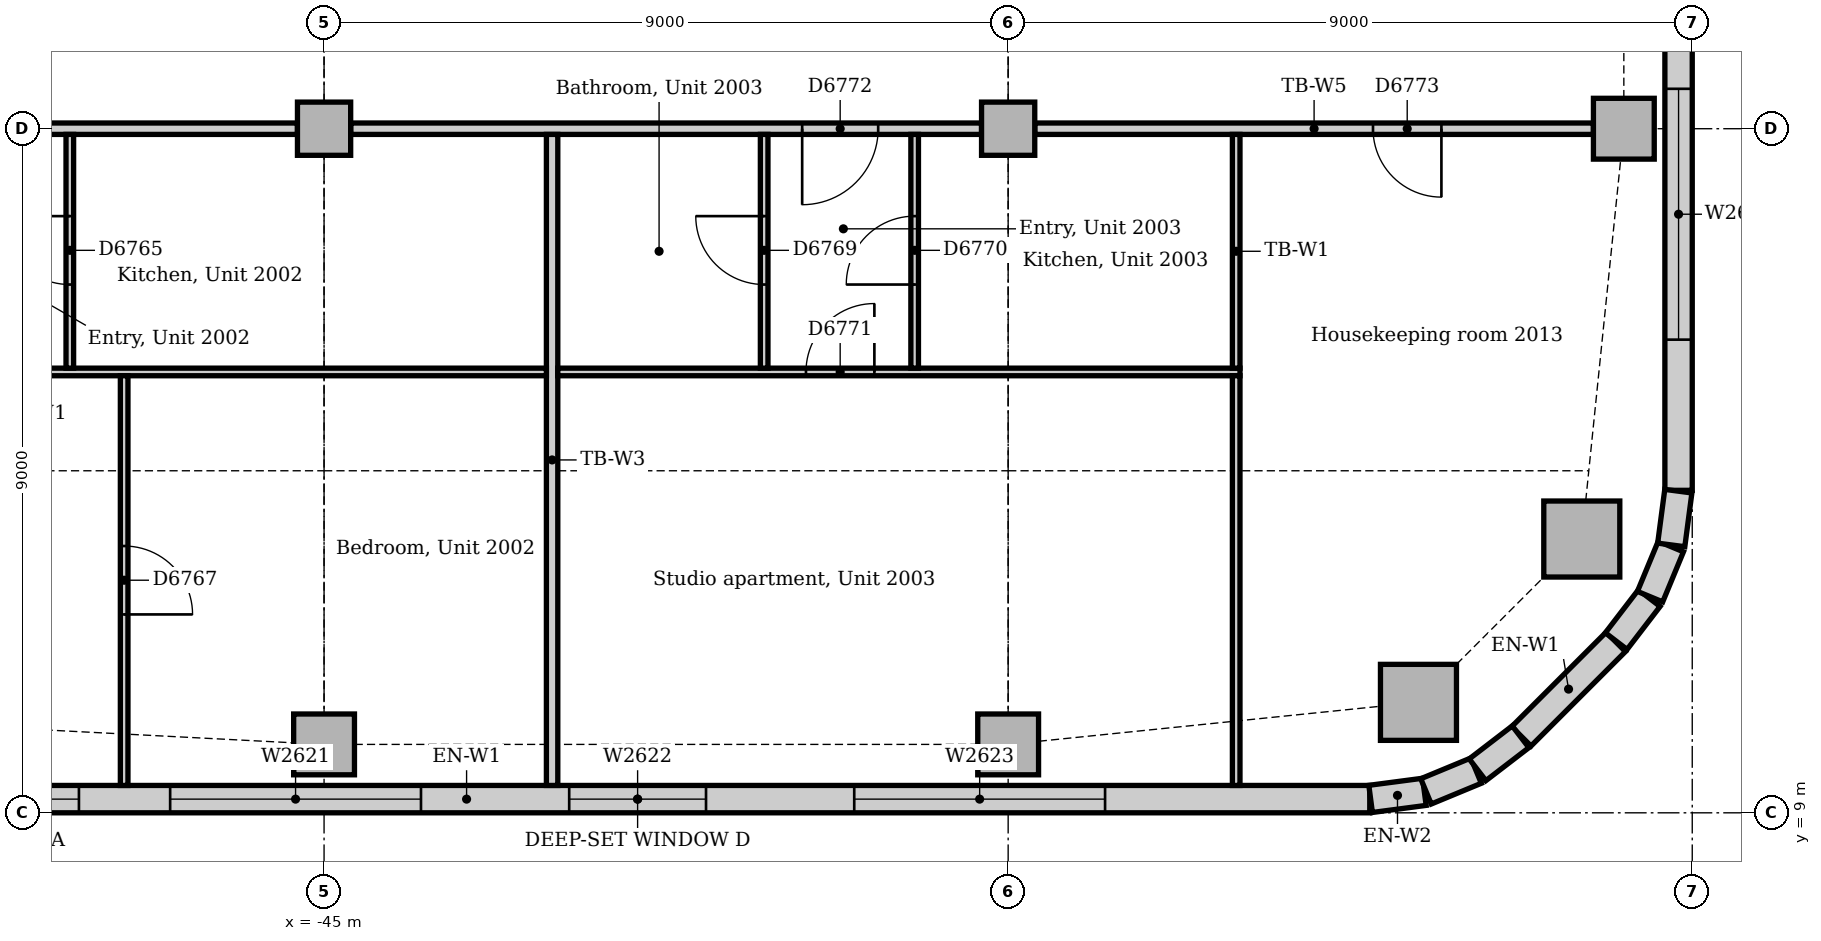
"""IFC4 building model, lengths in metres.
Left out: names, types, materials, properties, quantities, classifications, styles, units other than length and angle.
Written with IfcOpenShell. Run it as: python <this file> out.ifc"""

import sys

from ifc_helpers import new_model, si_unit, direction, frame, frame_2d, origin, origin_2d, place, context, subcontext, project, spatial, rectangle, extrude, element, fill, save


model = new_model("IFC4")
c1 = context("Model", 3, precision=1e-05, world=origin(), true_north=direction((0.0, 1.0)))
c2 = subcontext(c1, "Body", "Model", "MODEL_VIEW")
j1 = project(units=[si_unit("LENGTHUNIT", "METRE"), si_unit("PLANEANGLEUNIT", "RADIAN")], contexts=[c1])
p1 = place(None, origin())
s1 = spatial("IfcSite", under=j1, at=p1, CompositionType="ELEMENT")
p2 = place(p1, origin())
s2 = spatial("IfcBuilding", under=s1, at=p2, CompositionType="ELEMENT")
p3 = place(p2, frame((0.0, 0.0, 87.0)))
s3 = spatial("IfcBuildingStorey", under=s2, at=p3, CompositionType="ELEMENT", Elevation=87.0)
for number, where, z_axis, x_axis in (
    (1, (-30.602, 10.453, 0.0), (0.0, 0.0, 1.0), (1.0, 0.0, 0.0)),
    (2, (-28.453, 12.602, 0.0), (0.0, 0.0, 1.0), (1.0, 0.0, 0.0)),
):
    element("IfcColumn", number, at=place(p3, frame(where, z_axis=z_axis, x_axis=x_axis)), inside=s3, PredefinedType="COLUMN", context=c2, shape_type="SweptSolid", body=[
        extrude(rectangle(XDim=1.0, YDim=1.0, at=origin_2d()), origin(), (0.0, 0.0, 1.0), 3.85),
    ])
for number, where, z_axis, x_axis in (
    (3, (-45.0, 9.9, 0.0), (0.0, 0.0, 1.0), (1.0, 0.0, 0.0)),
    (4, (-36.0, 9.9, 0.0), (0.0, 0.0, 1.0), (1.0, 0.0, 0.0)),
    (5, (-27.9, 18.0, 0.0), (0.0, 0.0, 1.0), (1.0, 0.0, 0.0)),
):
    element("IfcColumn", number, at=place(p3, frame(where, z_axis=z_axis, x_axis=x_axis)), inside=s3, PredefinedType="COLUMN", context=c2, shape_type="SweptSolid", body=[
        extrude(rectangle(XDim=0.8, YDim=0.8, at=origin_2d()), origin(), (0.0, 0.0, 1.0), 3.85),
    ])
for number, where, z_axis, x_axis in (
    (6, (-45.0, 18.0, 0.0), (0.0, 0.0, 1.0), (1.0, 0.0, 0.0)),
    (7, (-36.0, 18.0, 0.0), (0.0, 0.0, 1.0), (1.0, 0.0, 0.0)),
):
    element("IfcColumn", number, at=place(p3, frame(where, z_axis=z_axis, x_axis=x_axis)), inside=s3, PredefinedType="COLUMN", context=c2, shape_type="SweptSolid", body=[
        extrude(rectangle(XDim=0.7, YDim=0.7, at=origin_2d()), origin(), (0.0, 0.0, 1.0), 3.85),
    ])
p4 = place(p3, frame((-55.007, 9.18, 0.0), z_axis=(0.0, 0.0, 1.0), x_axis=(1.0, 0.0, 0.0)))
e8 = element("IfcWall", 8, at=p4, inside=s3, PredefinedType="STANDARD", context=c2, shape_type="SweptSolid", body=[
    extrude(rectangle(XDim=23.765, YDim=0.36, at=frame_2d((11.882, 0.0))), origin(), (0.0, 0.0, 1.0), 3.85),
])
p5 = place(p4, frame((3.482, 0.0, 0.9)))
e9 = element("IfcOpeningElement", 9, at=p5, cuts=e8, PredefinedType="OPENING", context=c2, shape_type="SweptSolid", body=[
    extrude(rectangle(XDim=3.3, YDim=1.6, at=frame_2d((1.65, 0.8))), frame((0.0, 0.19, 0.0), z_axis=(0.0, -1.0, 0.0), x_axis=(1.0, 0.0, 0.0)), (0.0, 0.0, 1.0), 0.38),
])
p6 = place(p4, frame((7.982, 0.0, 0.9)))
e10 = element("IfcOpeningElement", 10, at=p6, cuts=e8, PredefinedType="OPENING", context=c2, shape_type="SweptSolid", body=[
    extrude(rectangle(XDim=3.3, YDim=1.6, at=frame_2d((1.65, 0.8))), frame((0.0, 0.19, 0.0), z_axis=(0.0, -1.0, 0.0), x_axis=(1.0, 0.0, 0.0)), (0.0, 0.0, 1.0), 0.38),
])
p7 = place(p4, frame((13.232, 0.0, 0.9)))
e11 = element("IfcOpeningElement", 11, at=p7, cuts=e8, PredefinedType="OPENING", context=c2, shape_type="SweptSolid", body=[
    extrude(rectangle(XDim=1.8, YDim=1.6, at=frame_2d((0.9, 0.8))), frame((0.0, 0.19, 0.0), z_axis=(0.0, -1.0, 0.0), x_axis=(1.0, 0.0, 0.0)), (0.0, 0.0, 1.0), 0.38),
])
p8 = place(p4, frame((16.982, 0.0, 0.9)))
e12 = element("IfcOpeningElement", 12, at=p8, cuts=e8, PredefinedType="OPENING", context=c2, shape_type="SweptSolid", body=[
    extrude(rectangle(XDim=3.3, YDim=1.6, at=frame_2d((1.65, 0.8))), frame((0.0, 0.19, 0.0), z_axis=(0.0, -1.0, 0.0), x_axis=(1.0, 0.0, 0.0)), (0.0, 0.0, 1.0), 0.38),
])
p9 = place(p3, frame((-29.249, 10.006, 0.0), z_axis=(0.0, 0.0, 1.0), x_axis=(0.707106781187, 0.707106781187, 0.0)))
e13 = element("IfcWall", 13, at=p9, inside=s3, PredefinedType="STANDARD", context=c2, shape_type="SweptSolid", body=[
    extrude(rectangle(XDim=1.757, YDim=0.36, at=frame_2d((0.879, 0.0))), origin(), (0.0, 0.0, 1.0), 3.85),
])
p10 = place(p3, frame((-27.18, 13.243, 0.0), z_axis=(0.0, 0.0, 1.0), x_axis=(0.0, 1.0, 0.0)))
e14 = element("IfcWall", 14, at=p10, inside=s3, PredefinedType="STANDARD", context=c2, shape_type="SweptSolid", body=[
    extrude(rectangle(XDim=7.757, YDim=0.36, at=frame_2d((3.879, 0.0))), origin(), (0.0, 0.0, 1.0), 3.85),
])
p11 = place(p10, frame((1.982, 0.0, 0.9)))
e15 = element("IfcOpeningElement", 15, at=p11, cuts=e14, PredefinedType="OPENING", context=c2, shape_type="SweptSolid", body=[
    extrude(rectangle(XDim=3.3, YDim=1.6, at=frame_2d((1.65, 0.8))), frame((0.0, 0.19, 0.0), z_axis=(0.0, -1.0, 0.0), x_axis=(1.0, 0.0, 0.0)), (0.0, 0.0, 1.0), 0.38),
])
for number, where, z_axis, x_axis in (
    (16, (-31.231, 9.183, 0.0), (0.0, 0.0, 1.0), (0.991, 0.131, 0.0)),
    (17, (-30.503, 9.282, 0.0), (0.0, 0.0, 1.0), (0.924, 0.383, 0.0)),
):
    element("IfcWall", number, at=place(p3, frame(where, z_axis=z_axis, x_axis=x_axis)), inside=s3, PredefinedType="STANDARD", context=c2, shape_type="SweptSolid", body=[
        extrude(rectangle(XDim=0.713, YDim=0.36, at=frame_2d((0.356, 0.0))), origin(), (0.0, 0.0, 1.0), 3.85),
    ])
for number, where, z_axis, x_axis in (
    (18, (-29.825, 9.566, 0.0), (0.0, 0.0, 1.0), (0.793, 0.609, 0.0)),
    (19, (-28.0, 11.259, 0.0), (0.0, 0.0, 1.0), (0.609, 0.793, 0.0)),
):
    element("IfcWall", number, at=place(p3, frame(where, z_axis=z_axis, x_axis=x_axis)), inside=s3, PredefinedType="STANDARD", context=c2, shape_type="SweptSolid", body=[
        extrude(rectangle(XDim=0.713, YDim=0.36, at=frame_2d((0.357, 0.0))), origin(), (0.0, 0.0, 1.0), 3.85),
    ])
for number, where, z_axis, x_axis in (
    (20, (-27.555, 11.844, 0.0), (0.0, 0.0, 1.0), (0.383, 0.924, 0.0)),
    (21, (-27.276, 12.524, 0.0), (0.0, 0.0, 1.0), (0.131, 0.991, 0.0)),
):
    element("IfcWall", number, at=place(p3, frame(where, z_axis=z_axis, x_axis=x_axis)), inside=s3, PredefinedType="STANDARD", context=c2, shape_type="SweptSolid", body=[
        extrude(rectangle(XDim=0.713, YDim=0.36, at=frame_2d((0.356, 0.0))), origin(), (0.0, 0.0, 1.0), 3.85),
    ])
p12 = place(p3, frame((-35.65, 18.0, 0.0), z_axis=(0.0, 0.0, 1.0), x_axis=(1.0, 0.0, 0.0)))
e22 = element("IfcWall", 22, at=p12, inside=s3, PredefinedType="PARTITIONING", context=c2, shape_type="SweptSolid", body=[
    extrude(rectangle(XDim=7.35, YDim=0.15, at=frame_2d((3.675, 0.0))), origin(), (0.0, 0.0, 1.0), 3.158),
])
p13 = place(p12, frame((4.45, 0.0, 0.0)))
e23 = element("IfcOpeningElement", 23, at=p13, cuts=e22, PredefinedType="OPENING", context=c2, shape_type="SweptSolid", body=[
    extrude(rectangle(XDim=0.9, YDim=2.1, at=frame_2d((0.45, 1.05))), frame((0.0, 0.085, 0.0), z_axis=(0.0, -1.0, 0.0), x_axis=(1.0, 0.0, 0.0)), (0.0, 0.0, 1.0), 0.17),
])
p14 = place(p3, frame((-44.65, 18.0, 0.0), z_axis=(0.0, 0.0, 1.0), x_axis=(1.0, 0.0, 0.0)))
e24 = element("IfcWall", 24, at=p14, inside=s3, PredefinedType="PARTITIONING", context=c2, shape_type="SweptSolid", body=[
    extrude(rectangle(XDim=8.3, YDim=0.15, at=frame_2d((4.15, 0.0))), origin(), (0.0, 0.0, 1.0), 3.158),
])
p15 = place(p14, frame((5.94, 0.0, 0.0)))
e25 = element("IfcOpeningElement", 25, at=p15, cuts=e24, PredefinedType="OPENING", context=c2, shape_type="SweptSolid", body=[
    extrude(rectangle(XDim=1.0, YDim=2.1, at=frame_2d((0.5, 1.05))), frame((0.0, 0.085, 0.0), z_axis=(0.0, -1.0, 0.0), x_axis=(1.0, 0.0, 0.0)), (0.0, 0.0, 1.0), 0.17),
])
p16 = place(p3, frame((-53.65, 18.0, 0.0), z_axis=(0.0, 0.0, 1.0), x_axis=(1.0, 0.0, 0.0)))
e26 = element("IfcWall", 26, at=p16, inside=s3, PredefinedType="PARTITIONING", context=c2, shape_type="SweptSolid", body=[
    extrude(rectangle(XDim=8.3, YDim=0.15, at=frame_2d((4.15, 0.0))), origin(), (0.0, 0.0, 1.0), 3.158),
])
p17 = place(p16, frame((3.335, 0.0, 0.0)))
e27 = element("IfcOpeningElement", 27, at=p17, cuts=e26, PredefinedType="OPENING", context=c2, shape_type="SweptSolid", body=[
    extrude(rectangle(XDim=1.0, YDim=2.1, at=frame_2d((0.5, 1.05))), frame((0.0, 0.085, 0.0), z_axis=(0.0, -1.0, 0.0), x_axis=(1.0, 0.0, 0.0)), (0.0, 0.0, 1.0), 0.17),
])
p18 = place(p3, frame((-42.0, 9.36, 0.0), z_axis=(0.0, 0.0, 1.0), x_axis=(0.0, 1.0, 0.0)))
e28 = element("IfcWall", 28, at=p18, inside=s3, PredefinedType="PARTITIONING", context=c2, shape_type="SweptSolid", body=[
    extrude(rectangle(XDim=8.565, YDim=0.15, at=frame_2d((4.282, 0.0))), origin(), (0.0, 0.0, 1.0), 3.85),
])
p19 = place(p3, frame((-55.55, 14.8, 0.0), z_axis=(0.0, 0.0, 1.0), x_axis=(1.0, 0.0, 0.0)))
e29 = element("IfcWall", 29, at=p19, inside=s3, PredefinedType="PARTITIONING", context=c2, shape_type="SweptSolid", body=[
    extrude(rectangle(XDim=13.475, YDim=0.1, at=frame_2d((6.737, 0.0))), origin(), (0.0, 0.0, 1.0), 3.85),
])
p20 = place(p19, frame((5.285, 0.0, 0.0)))
e30 = element("IfcOpeningElement", 30, at=p20, cuts=e29, PredefinedType="OPENING", context=c2, shape_type="SweptSolid", body=[
    extrude(rectangle(XDim=0.9, YDim=2.1, at=frame_2d((0.45, 1.05))), frame((0.0, 0.06, 0.0), z_axis=(0.0, -1.0, 0.0), x_axis=(1.0, 0.0, 0.0)), (0.0, 0.0, 1.0), 0.12),
])
p21 = place(p3, frame((-41.925, 14.8, 0.0), z_axis=(0.0, 0.0, 1.0), x_axis=(1.0, 0.0, 0.0)))
e31 = element("IfcWall", 31, at=p21, inside=s3, PredefinedType="PARTITIONING", context=c2, shape_type="SweptSolid", body=[
    extrude(rectangle(XDim=8.975, YDim=0.1, at=frame_2d((4.487, 0.0))), origin(), (0.0, 0.0, 1.0), 3.85),
])
p22 = place(p21, frame((3.265, 0.0, 0.0)))
e32 = element("IfcOpeningElement", 32, at=p22, cuts=e31, PredefinedType="OPENING", context=c2, shape_type="SweptSolid", body=[
    extrude(rectangle(XDim=0.9, YDim=2.1, at=frame_2d((0.45, 1.05))), frame((0.0, 0.06, 0.0), z_axis=(0.0, -1.0, 0.0), x_axis=(1.0, 0.0, 0.0)), (0.0, 0.0, 1.0), 0.12),
])
p23 = place(p3, frame((-33.0, 14.85, 0.0), z_axis=(0.0, 0.0, 1.0), x_axis=(0.0, 1.0, 0.0)))
e33 = element("IfcWall", 33, at=p23, inside=s3, PredefinedType="PARTITIONING", context=c2, shape_type="SweptSolid", body=[
    extrude(rectangle(XDim=3.075, YDim=0.1, at=frame_2d((1.538, 0.0))), origin(), (0.0, 0.0, 1.0), 3.85),
])
p24 = place(p3, frame((-33.0, 9.36, 0.0), z_axis=(0.0, 0.0, 1.0), x_axis=(0.0, 1.0, 0.0)))
e34 = element("IfcWall", 34, at=p24, inside=s3, PredefinedType="PARTITIONING", context=c2, shape_type="SweptSolid", body=[
    extrude(rectangle(XDim=5.39, YDim=0.1, at=frame_2d((2.695, 0.0))), origin(), (0.0, 0.0, 1.0), 3.85),
])
p25 = place(p3, frame((-47.63, 9.36, 0.0), z_axis=(0.0, 0.0, 1.0), x_axis=(0.0, 1.0, 0.0)))
e35 = element("IfcWall", 35, at=p25, inside=s3, PredefinedType="PARTITIONING", context=c2, shape_type="SweptSolid", body=[
    extrude(rectangle(XDim=5.39, YDim=0.1, at=frame_2d((2.695, 0.0))), origin(), (0.0, 0.0, 1.0), 3.85),
])
p26 = place(p25, frame((2.25, 0.0, 0.0)))
e36 = element("IfcOpeningElement", 36, at=p26, cuts=e35, PredefinedType="OPENING", context=c2, shape_type="SweptSolid", body=[
    extrude(rectangle(XDim=0.9, YDim=2.1, at=frame_2d((0.45, 1.05))), frame((0.0, 0.06, 0.0), z_axis=(0.0, -1.0, 0.0), x_axis=(1.0, 0.0, 0.0)), (0.0, 0.0, 1.0), 0.12),
])
p27 = place(p3, frame((-48.345, 14.85, 0.0), z_axis=(0.0, 0.0, 1.0), x_axis=(0.0, 1.0, 0.0)))
e37 = element("IfcWall", 37, at=p27, inside=s3, PredefinedType="PARTITIONING", context=c2, shape_type="SweptSolid", body=[
    extrude(rectangle(XDim=3.075, YDim=0.1, at=frame_2d((1.538, 0.0))), origin(), (0.0, 0.0, 1.0), 3.85),
])
p28 = place(p27, frame((1.1, 0.0, 0.0)))
e38 = element("IfcOpeningElement", 38, at=p28, cuts=e37, PredefinedType="OPENING", context=c2, shape_type="SweptSolid", body=[
    extrude(rectangle(XDim=0.9, YDim=2.1, at=frame_2d((0.45, 1.05))), frame((0.0, 0.06, 0.0), z_axis=(0.0, -1.0, 0.0), x_axis=(1.0, 0.0, 0.0)), (0.0, 0.0, 1.0), 0.12),
])
p29 = place(p3, frame((-39.21, 14.85, 0.0), z_axis=(0.0, 0.0, 1.0), x_axis=(0.0, 1.0, 0.0)))
e39 = element("IfcWall", 39, at=p29, inside=s3, PredefinedType="PARTITIONING", context=c2, shape_type="SweptSolid", body=[
    extrude(rectangle(XDim=3.075, YDim=0.1, at=frame_2d((1.538, 0.0))), origin(), (0.0, 0.0, 1.0), 3.85),
])
p30 = place(p29, frame((1.1, 0.0, 0.0)))
e40 = element("IfcOpeningElement", 40, at=p30, cuts=e39, PredefinedType="OPENING", context=c2, shape_type="SweptSolid", body=[
    extrude(rectangle(XDim=0.9, YDim=2.1, at=frame_2d((0.45, 1.05))), frame((0.0, 0.06, 0.0), z_axis=(0.0, -1.0, 0.0), x_axis=(1.0, 0.0, 0.0)), (0.0, 0.0, 1.0), 0.12),
])
p31 = place(p3, frame((-37.23, 14.85, 0.0), z_axis=(0.0, 0.0, 1.0), x_axis=(0.0, 1.0, 0.0)))
e41 = element("IfcWall", 41, at=p31, inside=s3, PredefinedType="PARTITIONING", context=c2, shape_type="SweptSolid", body=[
    extrude(rectangle(XDim=3.075, YDim=0.1, at=frame_2d((1.538, 0.0))), origin(), (0.0, 0.0, 1.0), 3.85),
])
p32 = place(p31, frame((1.1, 0.0, 0.0)))
e42 = element("IfcOpeningElement", 42, at=p32, cuts=e41, PredefinedType="OPENING", context=c2, shape_type="SweptSolid", body=[
    extrude(rectangle(XDim=0.9, YDim=2.1, at=frame_2d((0.45, 1.05))), frame((0.0, 0.06, 0.0), z_axis=(0.0, -1.0, 0.0), x_axis=(1.0, 0.0, 0.0)), (0.0, 0.0, 1.0), 0.12),
])
p33 = place(p5, origin())
e43 = element("IfcWindow", 43, at=p33, inside=s3, PartitioningType="SINGLE_PANEL", PredefinedType="WINDOW", context=c2, shape_type="SweptSolid", body=[
    extrude(rectangle(XDim=3.3, YDim=1.6, at=frame_2d((1.65, 0.8))), frame((0.0, 0.13, 0.0), z_axis=(0.0, -1.0, 0.0), x_axis=(1.0, 0.0, 0.0)), (0.0, 0.0, 1.0), 0.06),
])
fill(e9, e43)
p34 = place(p6, origin())
e44 = element("IfcWindow", 44, at=p34, inside=s3, PartitioningType="SINGLE_PANEL", PredefinedType="WINDOW", context=c2, shape_type="SweptSolid", body=[
    extrude(rectangle(XDim=3.3, YDim=1.6, at=frame_2d((1.65, 0.8))), frame((0.0, 0.13, 0.0), z_axis=(0.0, -1.0, 0.0), x_axis=(1.0, 0.0, 0.0)), (0.0, 0.0, 1.0), 0.06),
])
fill(e10, e44)
p35 = place(p7, origin())
e45 = element("IfcWindow", 45, at=p35, inside=s3, PartitioningType="SINGLE_PANEL", PredefinedType="WINDOW", context=c2, shape_type="SweptSolid", body=[
    extrude(rectangle(XDim=1.8, YDim=1.6, at=frame_2d((0.9, 0.8))), frame((0.0, 0.13, 0.0), z_axis=(0.0, -1.0, 0.0), x_axis=(1.0, 0.0, 0.0)), (0.0, 0.0, 1.0), 0.06),
])
fill(e11, e45)
p36 = place(p8, origin())
e46 = element("IfcWindow", 46, at=p36, inside=s3, PartitioningType="SINGLE_PANEL", PredefinedType="WINDOW", context=c2, shape_type="SweptSolid", body=[
    extrude(rectangle(XDim=3.3, YDim=1.6, at=frame_2d((1.65, 0.8))), frame((0.0, 0.13, 0.0), z_axis=(0.0, -1.0, 0.0), x_axis=(1.0, 0.0, 0.0)), (0.0, 0.0, 1.0), 0.06),
])
fill(e12, e46)
p37 = place(p11, origin())
e47 = element("IfcWindow", 47, at=p37, inside=s3, PartitioningType="SINGLE_PANEL", PredefinedType="WINDOW", context=c2, shape_type="SweptSolid", body=[
    extrude(rectangle(XDim=3.3, YDim=1.6, at=frame_2d((1.65, 0.8))), frame((0.0, 0.13, 0.0), z_axis=(0.0, -1.0, 0.0), x_axis=(1.0, 0.0, 0.0)), (0.0, 0.0, 1.0), 0.06),
])
fill(e15, e47)
p38 = place(p28, origin())
e48 = element("IfcDoor", 48, at=p38, inside=s3, OperationType="SINGLE_SWING_RIGHT", PredefinedType="DOOR", context=c2, shape_type="SweptSolid", body=[
    extrude(rectangle(XDim=0.9, YDim=2.1, at=frame_2d((0.45, 1.05))), frame((0.0, 0.025, 0.0), z_axis=(0.0, -1.0, 0.0), x_axis=(1.0, 0.0, 0.0)), (0.0, 0.0, 1.0), 0.05),
])
fill(e38, e48)
p39 = place(p26, frame((0.9, 0.0, 0.0), z_axis=(0.0, 0.0, 1.0), x_axis=(-1.0, 0.0, 0.0)))
e49 = element("IfcDoor", 49, at=p39, inside=s3, OperationType="SINGLE_SWING_RIGHT", PredefinedType="DOOR", context=c2, shape_type="SweptSolid", body=[
    extrude(rectangle(XDim=0.9, YDim=2.1, at=frame_2d((0.45, 1.05))), frame((0.0, 0.025, 0.0), z_axis=(0.0, -1.0, 0.0), x_axis=(1.0, 0.0, 0.0)), (0.0, 0.0, 1.0), 0.05),
])
fill(e36, e49)
p40 = place(p30, origin())
e50 = element("IfcDoor", 50, at=p40, inside=s3, OperationType="SINGLE_SWING_RIGHT", PredefinedType="DOOR", context=c2, shape_type="SweptSolid", body=[
    extrude(rectangle(XDim=0.9, YDim=2.1, at=frame_2d((0.45, 1.05))), frame((0.0, 0.025, 0.0), z_axis=(0.0, -1.0, 0.0), x_axis=(1.0, 0.0, 0.0)), (0.0, 0.0, 1.0), 0.05),
])
fill(e40, e50)
p41 = place(p32, origin())
e51 = element("IfcDoor", 51, at=p41, inside=s3, OperationType="SINGLE_SWING_LEFT", PredefinedType="DOOR", context=c2, shape_type="SweptSolid", body=[
    extrude(rectangle(XDim=0.9, YDim=2.1, at=frame_2d((0.45, 1.05))), frame((0.0, 0.025, 0.0), z_axis=(0.0, -1.0, 0.0), x_axis=(1.0, 0.0, 0.0)), (0.0, 0.0, 1.0), 0.05),
])
fill(e42, e51)
p42 = place(p22, origin())
e52 = element("IfcDoor", 52, at=p42, inside=s3, OperationType="SINGLE_SWING_RIGHT", PredefinedType="DOOR", context=c2, shape_type="SweptSolid", body=[
    extrude(rectangle(XDim=0.9, YDim=2.1, at=frame_2d((0.45, 1.05))), frame((0.0, 0.025, 0.0), z_axis=(0.0, -1.0, 0.0), x_axis=(1.0, 0.0, 0.0)), (0.0, 0.0, 1.0), 0.05),
])
fill(e32, e52)
p43 = place(p15, frame((1.0, 0.0, 0.0), z_axis=(0.0, 0.0, 1.0), x_axis=(-1.0, 0.0, 0.0)))
e53 = element("IfcDoor", 53, at=p43, inside=s3, OperationType="SINGLE_SWING_RIGHT", PredefinedType="DOOR", context=c2, shape_type="SweptSolid", body=[
    extrude(rectangle(XDim=1.0, YDim=2.1, at=frame_2d((0.5, 1.05))), frame((0.0, 0.025, 0.0), z_axis=(0.0, -1.0, 0.0), x_axis=(1.0, 0.0, 0.0)), (0.0, 0.0, 1.0), 0.05),
])
fill(e25, e53)
p44 = place(p13, frame((0.9, 0.0, 0.0), z_axis=(0.0, 0.0, 1.0), x_axis=(-1.0, 0.0, 0.0)))
e54 = element("IfcDoor", 54, at=p44, inside=s3, OperationType="SINGLE_SWING_LEFT", PredefinedType="DOOR", context=c2, shape_type="SweptSolid", body=[
    extrude(rectangle(XDim=0.9, YDim=2.1, at=frame_2d((0.45, 1.05))), frame((0.0, 0.025, 0.0), z_axis=(0.0, -1.0, 0.0), x_axis=(1.0, 0.0, 0.0)), (0.0, 0.0, 1.0), 0.05),
])
fill(e23, e54)
save(model, sys.argv[1])
